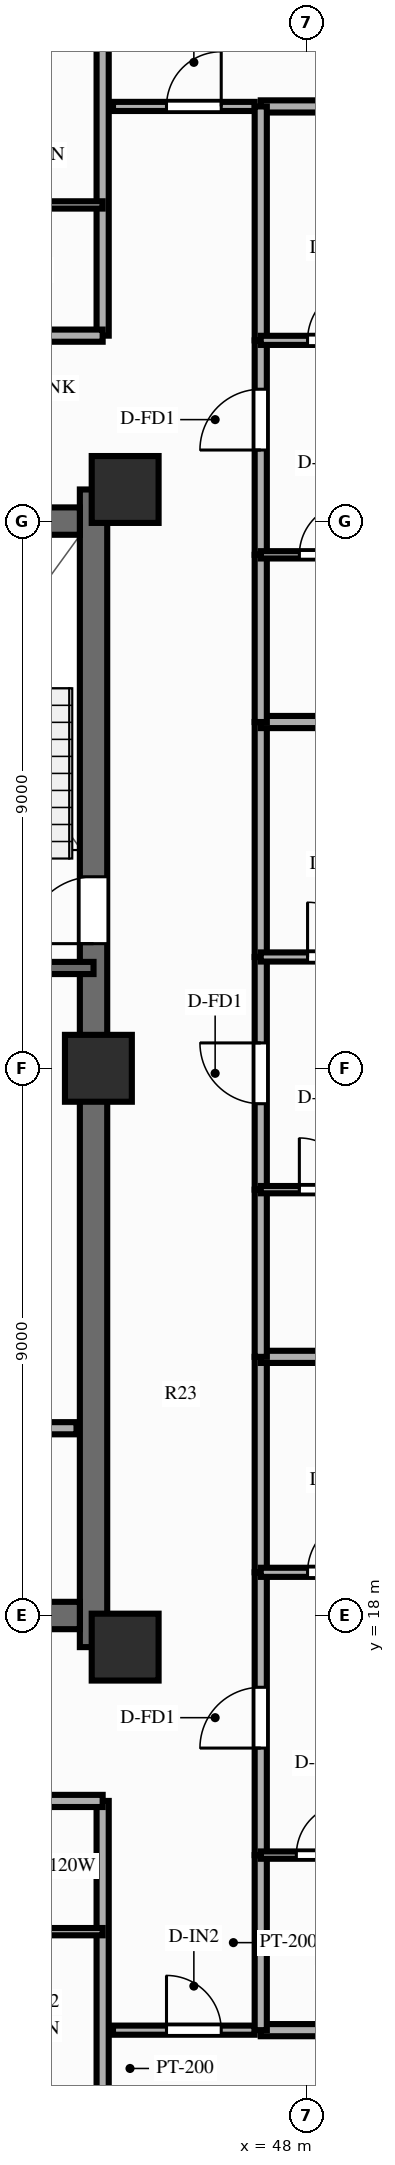
"""IFC4 building model, lengths in metres.
Left out: names, types, materials, properties, quantities, classifications, styles, units other than length and angle.
Written with IfcOpenShell. Run it as: python <this file> out.ifc"""

import sys

from ifc_helpers import new_model, si_unit, direction, frame, frame_2d, origin, origin_2d, place, context, subcontext, project, spatial, rectangle, extrude, source, transform, mapped, element, fill, save


model = new_model("IFC4")
c1 = context("Model", 3, precision=1e-05, world=origin(), true_north=direction((0.0, 1.0)))
c2 = subcontext(c1, "Body", "Model", "MODEL_VIEW")
j1 = project(units=[si_unit("LENGTHUNIT", "METRE"), si_unit("PLANEANGLEUNIT", "RADIAN")], contexts=[c1])
p1 = place(None, origin())
s1 = spatial("IfcSite", under=j1, at=p1, CompositionType="ELEMENT")
p2 = place(p1, origin())
s2 = spatial("IfcBuilding", under=s1, at=p2, CompositionType="ELEMENT")
p3 = place(p2, frame((0.0, 0.0, 182.8)))
s3 = spatial("IfcBuildingStorey", under=s2, at=p3, CompositionType="ELEMENT", Elevation=182.8)
p4 = place(p3, frame((44.5, 17.48, 0.0), z_axis=(0.0, 0.0, 1.0), x_axis=(0.0, 1.0, 0.0)))
e1 = element("IfcWall", 1, at=p4, inside=s3, PredefinedType="SHEAR", context=c2, shape_type="SweptSolid", body=[
    extrude(rectangle(XDim=19.04, YDim=0.45, at=frame_2d((9.52, 0.0))), origin(), (0.0, 0.0, 1.0), 3.9),
])
p5 = place(p4, frame((12.67, 0.0, 0.0), z_axis=(0.0, 0.0, 1.0), x_axis=(-1.0, 0.0, 0.0)))
e2 = element("IfcOpeningElement", 2, at=p5, cuts=e1, PredefinedType="OPENING", context=c2, shape_type="SweptSolid", body=[
    extrude(rectangle(XDim=1.1, YDim=2.15, at=frame_2d((0.55, 1.075))), frame((0.0, 0.237, 0.0), z_axis=(0.0, -1.0, 0.0), x_axis=(1.0, 0.0, 0.0)), (0.0, 0.0, 1.0), 0.474),
])
p6 = place(p3, frame((31.725, 18.0, 0.0), z_axis=(0.0, 0.0, 1.0), x_axis=(1.0, 0.0, 0.0)))
e3 = element("IfcWall", 3, at=p6, inside=s3, PredefinedType="SHEAR", context=c2, shape_type="SweptSolid", body=[
    extrude(rectangle(XDim=12.55, YDim=0.45, at=frame_2d((6.275, 0.0))), origin(), (0.0, 0.0, 1.0), 3.9),
])
p7 = place(p3, frame((31.725, 36.0, 0.0), z_axis=(0.0, 0.0, 1.0), x_axis=(1.0, 0.0, 0.0)))
e4 = element("IfcWall", 4, at=p7, inside=s3, PredefinedType="SHEAR", context=c2, shape_type="SweptSolid", body=[
    extrude(rectangle(XDim=12.55, YDim=0.45, at=frame_2d((6.275, 0.0))), origin(), (0.0, 0.0, 1.0), 3.9),
])
p8 = place(p7, frame((5.225, 0.0, 0.0), z_axis=(0.0, 0.0, 1.0), x_axis=(-1.0, 0.0, 0.0)))
e5 = element("IfcOpeningElement", 5, at=p8, cuts=e4, PredefinedType="OPENING", context=c2, shape_type="SweptSolid", body=[
    extrude(rectangle(XDim=1.4, YDim=2.15, at=frame_2d((0.7, 1.075))), frame((0.0, 0.237, 0.0), z_axis=(0.0, -1.0, 0.0), x_axis=(1.0, 0.0, 0.0)), (0.0, 0.0, 1.0), 0.474),
])
m1 = source(origin(), c2, "Body", "SweptSolid", [
    extrude(rectangle(XDim=1.1, YDim=1.1, at=origin_2d()), origin(), (0.0, 0.0, 1.0), 3.9),
])
for number, where, z_axis, x_axis in (
    (6, (45.02, 17.48, 0.0), (0.0, 0.0, 1.0), (1.0, 0.0, 0.0)),
    (7, (45.02, 36.52, 0.0), (0.0, 0.0, 1.0), (1.0, 0.0, 0.0)),
    (8, (44.58, 27.0, 0.0), (0.0, 0.0, 1.0), (1.0, 0.0, 0.0)),
):
    element("IfcColumn", number, at=place(p3, frame(where, z_axis=z_axis, x_axis=x_axis)), inside=s3, PredefinedType="COLUMN", context=c2, shape_type="MappedRepresentation", body=[
        mapped(m1, transform((0.0, 0.0, 0.0), scale=1.0)),
    ])
p9 = place(p3, frame((42.88, 21.08, 0.0), z_axis=(0.0, 0.0, 1.0), x_axis=(1.0, 0.0, 0.0)))
e9 = element("IfcWall", 9, at=p9, inside=s3, PredefinedType="PARTITIONING", context=c2, shape_type="SweptSolid", body=[
    extrude(rectangle(XDim=1.34, YDim=0.2, at=frame_2d((0.67, 0.0))), origin(), (0.0, 0.0, 1.0), 3.69),
])
p10 = place(p3, frame((40.57, 28.65, 0.0), z_axis=(0.0, 0.0, 1.0), x_axis=(1.0, 0.0, 0.0)))
e10 = element("IfcWall", 10, at=p10, inside=s3, PredefinedType="SOLIDWALL", context=c2, shape_type="SweptSolid", body=[
    extrude(rectangle(XDim=3.93, YDim=0.2, at=frame_2d((1.965, 0.0))), origin(), (0.0, 0.0, 1.0), 3.69),
])
p11 = place(p3, frame((44.82, 11.18, 0.0), z_axis=(0.0, 0.0, 1.0), x_axis=(1.0, 0.0, 0.0)))
e11 = element("IfcWall", 11, at=p11, inside=s3, PredefinedType="PARTITIONING", context=c2, shape_type="SweptSolid", body=[
    extrude(rectangle(XDim=2.33, YDim=0.15, at=frame_2d((1.165, 0.0))), origin(), (0.0, 0.0, 1.0), 3.69),
])
p12 = place(p11, frame((0.88, 0.0, 0.0)))
e12 = element("IfcOpeningElement", 12, at=p12, cuts=e11, PredefinedType="OPENING", context=c2, shape_type="SweptSolid", body=[
    extrude(rectangle(XDim=0.9, YDim=2.1, at=frame_2d((0.45, 1.05))), frame((0.0, 0.087, 0.0), z_axis=(0.0, -1.0, 0.0), x_axis=(1.0, 0.0, 0.0)), (0.0, 0.0, 1.0), 0.174),
])
p13 = place(p3, frame((44.82, 42.82, 0.0), z_axis=(0.0, 0.0, 1.0), x_axis=(1.0, 0.0, 0.0)))
e13 = element("IfcWall", 13, at=p13, inside=s3, PredefinedType="PARTITIONING", context=c2, shape_type="SweptSolid", body=[
    extrude(rectangle(XDim=2.33, YDim=0.15, at=frame_2d((1.165, 0.0))), origin(), (0.0, 0.0, 1.0), 3.69),
])
p14 = place(p13, frame((0.88, 0.0, 0.0)))
e14 = element("IfcOpeningElement", 14, at=p14, cuts=e13, PredefinedType="OPENING", context=c2, shape_type="SweptSolid", body=[
    extrude(rectangle(XDim=0.9, YDim=2.1, at=frame_2d((0.45, 1.05))), frame((0.0, 0.087, 0.0), z_axis=(0.0, -1.0, 0.0), x_axis=(1.0, 0.0, 0.0)), (0.0, 0.0, 1.0), 0.174),
])
p15 = place(p3, frame((44.65, 14.95, 0.0), z_axis=(0.0, 0.0, 1.0), x_axis=(0.0, -1.0, 0.0)))
e15 = element("IfcWall", 15, at=p15, inside=s3, PredefinedType="PARTITIONING", context=c2, shape_type="SweptSolid", body=[
    extrude(rectangle(XDim=8.8, YDim=0.2, at=frame_2d((4.4, 0.0))), origin(), (0.0, 0.0, 1.0), 2.79),
])
p16 = place(p3, frame((41.8, 14.95, 0.0), z_axis=(0.0, 0.0, 1.0), x_axis=(1.0, 0.0, 0.0)))
e16 = element("IfcWall", 16, at=p16, inside=s3, PredefinedType="PARTITIONING", context=c2, shape_type="SweptSolid", body=[
    extrude(rectangle(XDim=2.85, YDim=0.2, at=frame_2d((1.425, 0.0))), origin(), (0.0, 0.0, 1.0), 3.69),
])
p17 = place(p3, frame((41.8, 12.8, 0.0), z_axis=(0.0, 0.0, 1.0), x_axis=(1.0, 0.0, 0.0)))
e17 = element("IfcWall", 17, at=p17, inside=s3, PredefinedType="PARTITIONING", context=c2, shape_type="SweptSolid", body=[
    extrude(rectangle(XDim=2.85, YDim=0.12, at=frame_2d((1.425, 0.0))), origin(), (0.0, 0.0, 1.0), 3.69),
])
p18 = place(p3, frame((44.65, 39.05, 0.0), z_axis=(0.0, 0.0, 1.0), x_axis=(0.0, 1.0, 0.0)))
e18 = element("IfcWall", 18, at=p18, inside=s3, PredefinedType="PARTITIONING", context=c2, shape_type="SweptSolid", body=[
    extrude(rectangle(XDim=8.8, YDim=0.2, at=frame_2d((4.4, 0.0))), origin(), (0.0, 0.0, 1.0), 2.79),
])
p19 = place(p3, frame((41.88, 39.05, 0.0), z_axis=(0.0, 0.0, 1.0), x_axis=(1.0, 0.0, 0.0)))
e19 = element("IfcWall", 19, at=p19, inside=s3, PredefinedType="PARTITIONING", context=c2, shape_type="SweptSolid", body=[
    extrude(rectangle(XDim=2.77, YDim=0.2, at=frame_2d((1.385, 0.0))), origin(), (0.0, 0.0, 1.0), 3.69),
])
p20 = place(p3, frame((41.88, 41.2, 0.0), z_axis=(0.0, 0.0, 1.0), x_axis=(1.0, 0.0, 0.0)))
e20 = element("IfcWall", 20, at=p20, inside=s3, PredefinedType="PARTITIONING", context=c2, shape_type="SweptSolid", body=[
    extrude(rectangle(XDim=2.77, YDim=0.12, at=frame_2d((1.385, 0.0))), origin(), (0.0, 0.0, 1.0), 3.69),
])
for number, where, z_axis, x_axis in (
    (21, (47.25, 11.18, 0.0), (0.0, 0.0, 1.0), (1.0, 0.0, 0.0)),
    (22, (47.25, 42.82, 0.0), (0.0, 0.0, 1.0), (1.0, 0.0, 0.0)),
):
    element("IfcWall", number, at=place(p3, frame(where, z_axis=z_axis, x_axis=x_axis)), inside=s3, PredefinedType="PARTITIONING", context=c2, shape_type="SweptSolid", body=[
        extrude(rectangle(XDim=10.85, YDim=0.2, at=frame_2d((5.425, 0.0))), origin(), (0.0, 0.0, 1.0), 3.69),
    ])
p21 = place(p3, frame((47.25, 11.18, 0.0), z_axis=(0.0, 0.0, 1.0), x_axis=(0.0, 1.0, 0.0)))
e23 = element("IfcWall", 23, at=p21, inside=s3, PredefinedType="PARTITIONING", context=c2, shape_type="SweptSolid", body=[
    extrude(rectangle(XDim=2.879, YDim=0.2, at=frame_2d((1.439, 0.0))), origin(), (0.0, 0.0, 1.0), 3.69),
])
p22 = place(p3, frame((47.25, 14.059, 0.0), z_axis=(0.0, 0.0, 1.0), x_axis=(0.0, 1.0, 0.0)))
e24 = element("IfcWall", 24, at=p22, inside=s3, PredefinedType="PARTITIONING", context=c2, shape_type="SweptSolid", body=[
    extrude(rectangle(XDim=4.651, YDim=0.2, at=frame_2d((2.326, 0.0))), origin(), (0.0, 0.0, 1.0), 3.69),
])
p23 = place(p22, frame((1.76, 0.0, 0.0)))
e25 = element("IfcOpeningElement", 25, at=p23, cuts=e24, PredefinedType="OPENING", context=c2, shape_type="SweptSolid", body=[
    extrude(rectangle(XDim=1.0, YDim=2.15, at=frame_2d((0.5, 1.075))), frame((0.0, 0.112, 0.0), z_axis=(0.0, -1.0, 0.0), x_axis=(1.0, 0.0, 0.0)), (0.0, 0.0, 1.0), 0.224),
])
p24 = place(p3, frame((47.25, 18.71, 0.0), z_axis=(0.0, 0.0, 1.0), x_axis=(0.0, 1.0, 0.0)))
e26 = element("IfcWall", 26, at=p24, inside=s3, PredefinedType="PARTITIONING", context=c2, shape_type="SweptSolid", body=[
    extrude(rectangle(XDim=3.544, YDim=0.2, at=frame_2d((1.772, 0.0))), origin(), (0.0, 0.0, 1.0), 3.69),
])
p25 = place(p3, frame((47.25, 14.059, 0.0), z_axis=(0.0, 0.0, 1.0), x_axis=(1.0, 0.0, 0.0)))
e27 = element("IfcWall", 27, at=p25, inside=s3, PredefinedType="PARTITIONING", context=c2, shape_type="SweptSolid", body=[
    extrude(rectangle(XDim=2.02, YDim=0.12, at=frame_2d((1.01, 0.0))), origin(), (0.0, 0.0, 1.0), 3.69),
])
p26 = place(p25, frame((0.585, 0.0, 0.0)))
e28 = element("IfcOpeningElement", 28, at=p26, cuts=e27, PredefinedType="OPENING", context=c2, shape_type="SweptSolid", body=[
    extrude(rectangle(XDim=0.85, YDim=2.05, at=frame_2d((0.425, 1.025))), frame((0.0, 0.072, 0.0), z_axis=(0.0, -1.0, 0.0), x_axis=(1.0, 0.0, 0.0)), (0.0, 0.0, 1.0), 0.144),
])
p27 = place(p3, frame((47.25, 18.71, 0.0), z_axis=(0.0, 0.0, 1.0), x_axis=(1.0, 0.0, 0.0)))
e29 = element("IfcWall", 29, at=p27, inside=s3, PredefinedType="PARTITIONING", context=c2, shape_type="SweptSolid", body=[
    extrude(rectangle(XDim=2.44, YDim=0.15, at=frame_2d((1.22, 0.0))), origin(), (0.0, 0.0, 1.0), 3.69),
])
p28 = place(p27, frame((0.77, 0.0, 0.0)))
e30 = element("IfcOpeningElement", 30, at=p28, cuts=e29, PredefinedType="OPENING", context=c2, shape_type="SweptSolid", body=[
    extrude(rectangle(XDim=0.9, YDim=2.1, at=frame_2d((0.45, 1.05))), frame((0.0, 0.087, 0.0), z_axis=(0.0, -1.0, 0.0), x_axis=(1.0, 0.0, 0.0)), (0.0, 0.0, 1.0), 0.174),
])
p29 = place(p3, frame((47.25, 22.254, 0.0), z_axis=(0.0, 0.0, 1.0), x_axis=(1.0, 0.0, 0.0)))
e31 = element("IfcWall", 31, at=p29, inside=s3, PredefinedType="PARTITIONING", context=c2, shape_type="SweptSolid", body=[
    extrude(rectangle(XDim=10.85, YDim=0.2, at=frame_2d((5.425, 0.0))), origin(), (0.0, 0.0, 1.0), 3.29),
])
p30 = place(p3, frame((47.25, 22.254, 0.0), z_axis=(0.0, 0.0, 1.0), x_axis=(0.0, 1.0, 0.0)))
e32 = element("IfcWall", 32, at=p30, inside=s3, PredefinedType="PARTITIONING", context=c2, shape_type="SweptSolid", body=[
    extrude(rectangle(XDim=2.75, YDim=0.2, at=frame_2d((1.375, 0.0))), origin(), (0.0, 0.0, 1.0), 3.69),
])
p31 = place(p3, frame((47.25, 25.004, 0.0), z_axis=(0.0, 0.0, 1.0), x_axis=(0.0, 1.0, 0.0)))
e33 = element("IfcWall", 33, at=p31, inside=s3, PredefinedType="PARTITIONING", context=c2, shape_type="SweptSolid", body=[
    extrude(rectangle(XDim=3.827, YDim=0.2, at=frame_2d((1.914, 0.0))), origin(), (0.0, 0.0, 1.0), 3.69),
])
p32 = place(p31, frame((1.413, 0.0, 0.0)))
e34 = element("IfcOpeningElement", 34, at=p32, cuts=e33, PredefinedType="OPENING", context=c2, shape_type="SweptSolid", body=[
    extrude(rectangle(XDim=1.0, YDim=2.15, at=frame_2d((0.5, 1.075))), frame((0.0, 0.112, 0.0), z_axis=(0.0, -1.0, 0.0), x_axis=(1.0, 0.0, 0.0)), (0.0, 0.0, 1.0), 0.224),
])
p33 = place(p3, frame((47.25, 28.831, 0.0), z_axis=(0.0, 0.0, 1.0), x_axis=(0.0, 1.0, 0.0)))
e35 = element("IfcWall", 35, at=p33, inside=s3, PredefinedType="PARTITIONING", context=c2, shape_type="SweptSolid", body=[
    extrude(rectangle(XDim=3.865, YDim=0.2, at=frame_2d((1.932, 0.0))), origin(), (0.0, 0.0, 1.0), 3.69),
])
p34 = place(p3, frame((47.25, 25.004, 0.0), z_axis=(0.0, 0.0, 1.0), x_axis=(1.0, 0.0, 0.0)))
e36 = element("IfcWall", 36, at=p34, inside=s3, PredefinedType="PARTITIONING", context=c2, shape_type="SweptSolid", body=[
    extrude(rectangle(XDim=2.12, YDim=0.12, at=frame_2d((1.06, 0.0))), origin(), (0.0, 0.0, 1.0), 3.69),
])
p35 = place(p34, frame((0.635, 0.0, 0.0)))
e37 = element("IfcOpeningElement", 37, at=p35, cuts=e36, PredefinedType="OPENING", context=c2, shape_type="SweptSolid", body=[
    extrude(rectangle(XDim=0.85, YDim=2.05, at=frame_2d((0.425, 1.025))), frame((0.0, 0.072, 0.0), z_axis=(0.0, -1.0, 0.0), x_axis=(1.0, 0.0, 0.0)), (0.0, 0.0, 1.0), 0.144),
])
p36 = place(p3, frame((47.25, 28.831, 0.0), z_axis=(0.0, 0.0, 1.0), x_axis=(1.0, 0.0, 0.0)))
e38 = element("IfcWall", 38, at=p36, inside=s3, PredefinedType="PARTITIONING", context=c2, shape_type="SweptSolid", body=[
    extrude(rectangle(XDim=2.44, YDim=0.15, at=frame_2d((1.22, 0.0))), origin(), (0.0, 0.0, 1.0), 3.69),
])
p37 = place(p36, frame((0.77, 0.0, 0.0)))
e39 = element("IfcOpeningElement", 39, at=p37, cuts=e38, PredefinedType="OPENING", context=c2, shape_type="SweptSolid", body=[
    extrude(rectangle(XDim=0.9, YDim=2.1, at=frame_2d((0.45, 1.05))), frame((0.0, 0.087, 0.0), z_axis=(0.0, -1.0, 0.0), x_axis=(1.0, 0.0, 0.0)), (0.0, 0.0, 1.0), 0.174),
])
p38 = place(p3, frame((47.25, 32.695, 0.0), z_axis=(0.0, 0.0, 1.0), x_axis=(1.0, 0.0, 0.0)))
e40 = element("IfcWall", 40, at=p38, inside=s3, PredefinedType="PARTITIONING", context=c2, shape_type="SweptSolid", body=[
    extrude(rectangle(XDim=10.85, YDim=0.2, at=frame_2d((5.425, 0.0))), origin(), (0.0, 0.0, 1.0), 3.69),
])
p39 = place(p3, frame((47.25, 32.695, 0.0), z_axis=(0.0, 0.0, 1.0), x_axis=(0.0, 1.0, 0.0)))
e41 = element("IfcWall", 41, at=p39, inside=s3, PredefinedType="PARTITIONING", context=c2, shape_type="SweptSolid", body=[
    extrude(rectangle(XDim=2.75, YDim=0.2, at=frame_2d((1.375, 0.0))), origin(), (0.0, 0.0, 1.0), 3.69),
])
p40 = place(p3, frame((47.25, 35.445, 0.0), z_axis=(0.0, 0.0, 1.0), x_axis=(0.0, 1.0, 0.0)))
e42 = element("IfcWall", 42, at=p40, inside=s3, PredefinedType="PARTITIONING", context=c2, shape_type="SweptSolid", body=[
    extrude(rectangle(XDim=3.527, YDim=0.2, at=frame_2d((1.764, 0.0))), origin(), (0.0, 0.0, 1.0), 3.69),
])
p41 = place(p40, frame((1.724, 0.0, 0.0)))
e43 = element("IfcOpeningElement", 43, at=p41, cuts=e42, PredefinedType="OPENING", context=c2, shape_type="SweptSolid", body=[
    extrude(rectangle(XDim=1.0, YDim=2.15, at=frame_2d((0.5, 1.075))), frame((0.0, 0.112, 0.0), z_axis=(0.0, -1.0, 0.0), x_axis=(1.0, 0.0, 0.0)), (0.0, 0.0, 1.0), 0.224),
])
p42 = place(p3, frame((47.25, 38.973, 0.0), z_axis=(0.0, 0.0, 1.0), x_axis=(0.0, 1.0, 0.0)))
e44 = element("IfcWall", 44, at=p42, inside=s3, PredefinedType="PARTITIONING", context=c2, shape_type="SweptSolid", body=[
    extrude(rectangle(XDim=3.847, YDim=0.2, at=frame_2d((1.924, 0.0))), origin(), (0.0, 0.0, 1.0), 3.69),
])
p43 = place(p3, frame((47.25, 35.445, 0.0), z_axis=(0.0, 0.0, 1.0), x_axis=(1.0, 0.0, 0.0)))
e45 = element("IfcWall", 45, at=p43, inside=s3, PredefinedType="PARTITIONING", context=c2, shape_type="SweptSolid", body=[
    extrude(rectangle(XDim=2.12, YDim=0.12, at=frame_2d((1.06, 0.0))), origin(), (0.0, 0.0, 1.0), 3.69),
])
p44 = place(p43, frame((0.635, 0.0, 0.0)))
e46 = element("IfcOpeningElement", 46, at=p44, cuts=e45, PredefinedType="OPENING", context=c2, shape_type="SweptSolid", body=[
    extrude(rectangle(XDim=0.85, YDim=2.05, at=frame_2d((0.425, 1.025))), frame((0.0, 0.072, 0.0), z_axis=(0.0, -1.0, 0.0), x_axis=(1.0, 0.0, 0.0)), (0.0, 0.0, 1.0), 0.144),
])
p45 = place(p3, frame((47.25, 38.973, 0.0), z_axis=(0.0, 0.0, 1.0), x_axis=(1.0, 0.0, 0.0)))
e47 = element("IfcWall", 47, at=p45, inside=s3, PredefinedType="PARTITIONING", context=c2, shape_type="SweptSolid", body=[
    extrude(rectangle(XDim=2.44, YDim=0.15, at=frame_2d((1.22, 0.0))), origin(), (0.0, 0.0, 1.0), 3.69),
])
p46 = place(p45, frame((0.77, 0.0, 0.0)))
e48 = element("IfcOpeningElement", 48, at=p46, cuts=e47, PredefinedType="OPENING", context=c2, shape_type="SweptSolid", body=[
    extrude(rectangle(XDim=0.9, YDim=2.1, at=frame_2d((0.45, 1.05))), frame((0.0, 0.087, 0.0), z_axis=(0.0, -1.0, 0.0), x_axis=(1.0, 0.0, 0.0)), (0.0, 0.0, 1.0), 0.174),
])
m2 = source(origin(), c2, "Body", "SweptSolid", [
    extrude(rectangle(XDim=1.1, YDim=2.15, at=frame_2d((0.55, 1.075))), frame((0.0, 0.025, 0.0), z_axis=(0.0, -1.0, 0.0), x_axis=(1.0, 0.0, 0.0)), (0.0, 0.0, 1.0), 0.05),
])
p47 = place(p5, origin())
e49 = element("IfcDoor", 49, at=p47, inside=s3, OperationType="SINGLE_SWING_RIGHT", PredefinedType="DOOR", context=c2, shape_type="MappedRepresentation", body=[
    mapped(m2, transform((0.0, 0.0, 0.0), scale=1.0)),
])
fill(e2, e49)
m3 = source(origin(), c2, "Body", "SweptSolid", [
    extrude(rectangle(XDim=0.9, YDim=2.1, at=frame_2d((0.45, 1.05))), frame((0.0, 0.025, 0.0), z_axis=(0.0, -1.0, 0.0), x_axis=(1.0, 0.0, 0.0)), (0.0, 0.0, 1.0), 0.05),
])
p48 = place(p12, origin())
e50 = element("IfcDoor", 50, at=p48, inside=s3, OperationType="SINGLE_SWING_LEFT", PredefinedType="DOOR", context=c2, shape_type="MappedRepresentation", body=[
    mapped(m3, transform((0.0, 0.0, 0.0), scale=1.0)),
])
fill(e12, e50)
p49 = place(p14, origin())
e51 = element("IfcDoor", 51, at=p49, inside=s3, OperationType="SINGLE_SWING_RIGHT", PredefinedType="DOOR", context=c2, shape_type="MappedRepresentation", body=[
    mapped(m3, transform((0.0, 0.0, 0.0), scale=1.0)),
])
fill(e14, e51)
m4 = source(origin(), c2, "Body", "SweptSolid", [
    extrude(rectangle(XDim=1.0, YDim=2.15, at=frame_2d((0.5, 1.075))), frame((0.0, 0.025, 0.0), z_axis=(0.0, -1.0, 0.0), x_axis=(1.0, 0.0, 0.0)), (0.0, 0.0, 1.0), 0.05),
])
p50 = place(p23, origin())
e52 = element("IfcDoor", 52, at=p50, inside=s3, OperationType="SINGLE_SWING_LEFT", PredefinedType="DOOR", context=c2, shape_type="MappedRepresentation", body=[
    mapped(m4, transform((0.0, 0.0, 0.0), scale=1.0)),
])
fill(e25, e52)
m5 = source(origin(), c2, "Body", "SweptSolid", [
    extrude(rectangle(XDim=0.85, YDim=2.05, at=frame_2d((0.425, 1.025))), frame((0.0, 0.025, 0.0), z_axis=(0.0, -1.0, 0.0), x_axis=(1.0, 0.0, 0.0)), (0.0, 0.0, 1.0), 0.05),
])
p51 = place(p26, origin())
e53 = element("IfcDoor", 53, at=p51, inside=s3, OperationType="SINGLE_SWING_RIGHT", PredefinedType="DOOR", context=c2, shape_type="MappedRepresentation", body=[
    mapped(m5, transform((0.0, 0.0, 0.0), scale=1.0)),
])
fill(e28, e53)
p52 = place(p28, origin())
e54 = element("IfcDoor", 54, at=p52, inside=s3, OperationType="SINGLE_SWING_RIGHT", PredefinedType="DOOR", context=c2, shape_type="MappedRepresentation", body=[
    mapped(m3, transform((0.0, 0.0, 0.0), scale=1.0)),
])
fill(e30, e54)
p53 = place(p32, origin())
e55 = element("IfcDoor", 55, at=p53, inside=s3, OperationType="SINGLE_SWING_RIGHT", PredefinedType="DOOR", context=c2, shape_type="MappedRepresentation", body=[
    mapped(m4, transform((0.0, 0.0, 0.0), scale=1.0)),
])
fill(e34, e55)
p54 = place(p35, origin())
e56 = element("IfcDoor", 56, at=p54, inside=s3, OperationType="SINGLE_SWING_LEFT", PredefinedType="DOOR", context=c2, shape_type="MappedRepresentation", body=[
    mapped(m5, transform((0.0, 0.0, 0.0), scale=1.0)),
])
fill(e37, e56)
p55 = place(p37, origin())
e57 = element("IfcDoor", 57, at=p55, inside=s3, OperationType="SINGLE_SWING_LEFT", PredefinedType="DOOR", context=c2, shape_type="MappedRepresentation", body=[
    mapped(m3, transform((0.0, 0.0, 0.0), scale=1.0)),
])
fill(e39, e57)
p56 = place(p41, origin())
e58 = element("IfcDoor", 58, at=p56, inside=s3, OperationType="SINGLE_SWING_LEFT", PredefinedType="DOOR", context=c2, shape_type="MappedRepresentation", body=[
    mapped(m4, transform((0.0, 0.0, 0.0), scale=1.0)),
])
fill(e43, e58)
p57 = place(p44, origin())
e59 = element("IfcDoor", 59, at=p57, inside=s3, OperationType="SINGLE_SWING_RIGHT", PredefinedType="DOOR", context=c2, shape_type="MappedRepresentation", body=[
    mapped(m5, transform((0.0, 0.0, 0.0), scale=1.0)),
])
fill(e46, e59)
p58 = place(p46, origin())
e60 = element("IfcDoor", 60, at=p58, inside=s3, OperationType="SINGLE_SWING_RIGHT", PredefinedType="DOOR", context=c2, shape_type="MappedRepresentation", body=[
    mapped(m3, transform((0.0, 0.0, 0.0), scale=1.0)),
])
fill(e48, e60)
save(model, sys.argv[1])
